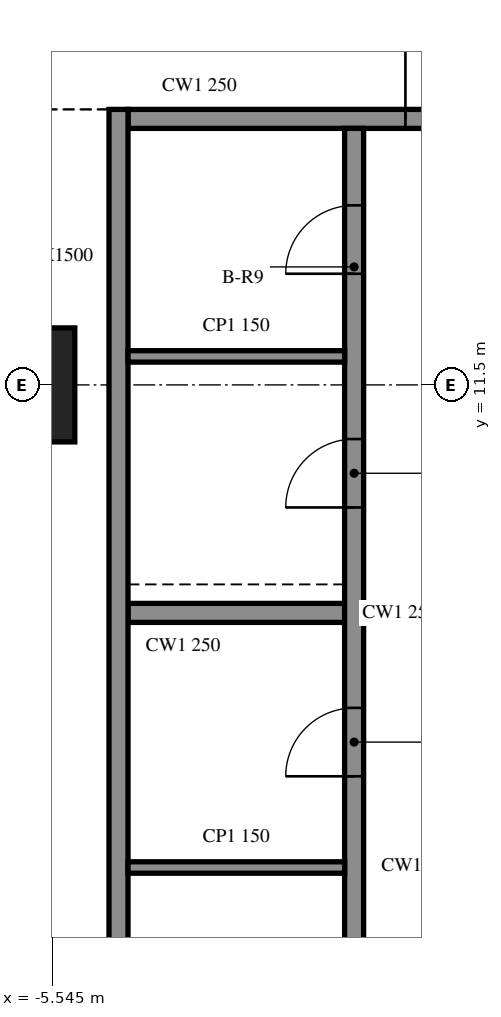
"""IFC4 building model, lengths in metres.
Left out: names, types, materials, properties, quantities, classifications, styles, units other than length and angle.
Written with IfcOpenShell. Run it as: python <this file> out.ifc"""

import sys

from ifc_helpers import new_model, si_unit, direction, frame, frame_2d, origin, origin_2d, place, context, subcontext, project, spatial, rectangle, extrude, element, fill, save


model = new_model("IFC4")
c1 = context("Model", 3, precision=1e-05, world=origin(), true_north=direction((0.0, 1.0)))
c2 = subcontext(c1, "Body", "Model", "MODEL_VIEW")
j1 = project(units=[si_unit("LENGTHUNIT", "METRE"), si_unit("PLANEANGLEUNIT", "RADIAN")], contexts=[c1])
p1 = place(None, origin())
s1 = spatial("IfcSite", under=j1, at=p1, CompositionType="ELEMENT")
p2 = place(p1, origin())
s2 = spatial("IfcBuilding", under=s1, at=p2, CompositionType="ELEMENT")
p3 = place(p2, frame((0.0, 0.0, 80.4)))
s3 = spatial("IfcBuildingStorey", under=s2, at=p3, CompositionType="ELEMENT", Elevation=80.4)
p4 = place(p3, frame((-6.0, 11.5, -0.55), z_axis=(0.0, 0.0, 1.0), x_axis=(1.0, 0.0, 0.0)))
e1 = element("IfcColumn", 1, at=p4, inside=s3, PredefinedType="COLUMN", context=c2, shape_type="SweptSolid", body=[
    extrude(rectangle(XDim=1.5, YDim=1.5, at=origin_2d()), origin(), (0.0, 0.0, 1.0), 4.61),
])
p5 = place(p3, frame((-4.675, 15.125, 0.0), z_axis=(0.0, 0.0, 1.0), x_axis=(0.0, -1.0, 0.0)))
e2 = element("IfcWall", 2, at=p5, inside=s3, PredefinedType="SOLIDWALL", context=c2, shape_type="SweptSolid", body=[
    extrude(rectangle(XDim=24.25, YDim=0.25, at=frame_2d((12.125, 0.0))), origin(), (0.0, 0.0, 1.0), 4.06),
])
p6 = place(p3, frame((-4.55, 15.0, 0.0), z_axis=(0.0, 0.0, 1.0), x_axis=(1.0, 0.0, 0.0)))
e3 = element("IfcWall", 3, at=p6, inside=s3, PredefinedType="SOLIDWALL", context=c2, shape_type="SweptSolid", body=[
    extrude(rectangle(XDim=9.1, YDim=0.25, at=frame_2d((4.55, 0.0))), origin(), (0.0, 0.0, 1.0), 4.06),
])
p7 = place(p6, frame((3.65, 0.0, 0.0)))
e4 = element("IfcOpeningElement", 4, at=p7, cuts=e3, PredefinedType="OPENING", context=c2, shape_type="SweptSolid", body=[
    extrude(rectangle(XDim=1.8, YDim=2.1, at=frame_2d((0.9, 1.05))), frame((0.0, 0.135, 0.0), z_axis=(0.0, -1.0, 0.0), x_axis=(1.0, 0.0, 0.0)), (0.0, 0.0, 1.0), 0.27),
])
p8 = place(p3, frame((-1.575, -8.875, 0.0), z_axis=(0.0, 0.0, 1.0), x_axis=(0.0, 1.0, 0.0)))
e5 = element("IfcWall", 5, at=p8, inside=s3, PredefinedType="SOLIDWALL", context=c2, shape_type="SweptSolid", body=[
    extrude(rectangle(XDim=23.75, YDim=0.25, at=frame_2d((11.875, 0.0))), origin(), (0.0, 0.0, 1.0), 4.06),
])
p9 = place(p8, frame((9.775, 0.0, 0.0)))
e6 = element("IfcOpeningElement", 6, at=p9, cuts=e5, PredefinedType="OPENING", context=c2, shape_type="SweptSolid", body=[
    extrude(rectangle(XDim=0.9, YDim=2.1, at=frame_2d((0.45, 1.05))), frame((0.0, 0.135, 0.0), z_axis=(0.0, -1.0, 0.0), x_axis=(1.0, 0.0, 0.0)), (0.0, 0.0, 1.0), 0.27),
])
p10 = place(p8, frame((15.225, 0.0, 0.0)))
e7 = element("IfcOpeningElement", 7, at=p10, cuts=e5, PredefinedType="OPENING", context=c2, shape_type="SweptSolid", body=[
    extrude(rectangle(XDim=0.9, YDim=2.1, at=frame_2d((0.45, 1.05))), frame((0.0, 0.135, 0.0), z_axis=(0.0, -1.0, 0.0), x_axis=(1.0, 0.0, 0.0)), (0.0, 0.0, 1.0), 0.27),
])
p11 = place(p8, frame((1.252, 0.0, 0.0)))
e8 = element("IfcOpeningElement", 8, at=p11, cuts=e5, PredefinedType="OPENING", context=c2, shape_type="SweptSolid", body=[
    extrude(rectangle(XDim=0.9, YDim=2.1, at=frame_2d((0.45, 1.05))), frame((0.0, 0.135, 0.0), z_axis=(0.0, -1.0, 0.0), x_axis=(1.0, 0.0, 0.0)), (0.0, 0.0, 1.0), 0.27),
])
p12 = place(p8, frame((4.327, 0.0, 0.0)))
e9 = element("IfcOpeningElement", 9, at=p12, cuts=e5, PredefinedType="OPENING", context=c2, shape_type="SweptSolid", body=[
    extrude(rectangle(XDim=0.9, YDim=2.1, at=frame_2d((0.45, 1.05))), frame((0.0, 0.135, 0.0), z_axis=(0.0, -1.0, 0.0), x_axis=(1.0, 0.0, 0.0)), (0.0, 0.0, 1.0), 0.27),
])
p13 = place(p8, frame((18.762, 0.0, 0.0)))
e10 = element("IfcOpeningElement", 10, at=p13, cuts=e5, PredefinedType="OPENING", context=c2, shape_type="SweptSolid", body=[
    extrude(rectangle(XDim=0.9, YDim=2.1, at=frame_2d((0.45, 1.05))), frame((0.0, 0.135, 0.0), z_axis=(0.0, -1.0, 0.0), x_axis=(1.0, 0.0, 0.0)), (0.0, 0.0, 1.0), 0.27),
])
p14 = place(p8, frame((21.837, 0.0, 0.0)))
e11 = element("IfcOpeningElement", 11, at=p14, cuts=e5, PredefinedType="OPENING", context=c2, shape_type="SweptSolid", body=[
    extrude(rectangle(XDim=0.9, YDim=2.1, at=frame_2d((0.45, 1.05))), frame((0.0, 0.135, 0.0), z_axis=(0.0, -1.0, 0.0), x_axis=(1.0, 0.0, 0.0)), (0.0, 0.0, 1.0), 0.27),
])
p15 = place(p3, frame((-4.55, 8.5, 0.0), z_axis=(0.0, 0.0, 1.0), x_axis=(1.0, 0.0, 0.0)))
e12 = element("IfcWall", 12, at=p15, inside=s3, PredefinedType="SOLIDWALL", context=c2, shape_type="SweptSolid", body=[
    extrude(rectangle(XDim=2.85, YDim=0.25, at=frame_2d((1.425, 0.0))), origin(), (0.0, 0.0, 1.0), 4.06),
])
for number, where, z_axis, x_axis in (
    (13, (-4.55, 5.15, 0.0), (0.0, 0.0, 1.0), (1.0, 0.0, 0.0)),
    (14, (-4.55, 11.875, 0.0), (0.0, 0.0, 1.0), (1.0, 0.0, 0.0)),
):
    element("IfcWall", number, at=place(p3, frame(where, z_axis=z_axis, x_axis=x_axis)), inside=s3, PredefinedType="PARTITIONING", context=c2, shape_type="SweptSolid", body=[
        extrude(rectangle(XDim=2.85, YDim=0.15, at=frame_2d((1.425, 0.0))), origin(), (0.0, 0.0, 1.0), 4.06),
    ])
p16 = place(p7, origin())
e15 = element("IfcDoor", 15, at=p16, inside=s3, OperationType="DOUBLE_DOOR_SINGLE_SWING", PredefinedType="DOOR", context=c2, shape_type="SweptSolid", body=[
    extrude(rectangle(XDim=1.8, YDim=2.1, at=frame_2d((0.9, 1.05))), frame((0.0, 0.025, 0.0), z_axis=(0.0, -1.0, 0.0), x_axis=(1.0, 0.0, 0.0)), (0.0, 0.0, 1.0), 0.05),
])
fill(e4, e15)
p17 = place(p10, origin())
e16 = element("IfcDoor", 16, at=p17, inside=s3, OperationType="SINGLE_SWING_RIGHT", PredefinedType="DOOR", context=c2, shape_type="SweptSolid", body=[
    extrude(rectangle(XDim=0.9, YDim=2.1, at=frame_2d((0.45, 1.05))), frame((0.0, 0.025, 0.0), z_axis=(0.0, -1.0, 0.0), x_axis=(1.0, 0.0, 0.0)), (0.0, 0.0, 1.0), 0.05),
])
fill(e7, e16)
p18 = place(p13, origin())
e17 = element("IfcDoor", 17, at=p18, inside=s3, OperationType="SINGLE_SWING_RIGHT", PredefinedType="DOOR", context=c2, shape_type="SweptSolid", body=[
    extrude(rectangle(XDim=0.9, YDim=2.1, at=frame_2d((0.45, 1.05))), frame((0.0, 0.025, 0.0), z_axis=(0.0, -1.0, 0.0), x_axis=(1.0, 0.0, 0.0)), (0.0, 0.0, 1.0), 0.05),
])
fill(e10, e17)
p19 = place(p14, origin())
e18 = element("IfcDoor", 18, at=p19, inside=s3, OperationType="SINGLE_SWING_LEFT", PredefinedType="DOOR", context=c2, shape_type="SweptSolid", body=[
    extrude(rectangle(XDim=0.9, YDim=2.1, at=frame_2d((0.45, 1.05))), frame((0.0, 0.025, 0.0), z_axis=(0.0, -1.0, 0.0), x_axis=(1.0, 0.0, 0.0)), (0.0, 0.0, 1.0), 0.05),
])
fill(e11, e18)
save(model, sys.argv[1])
